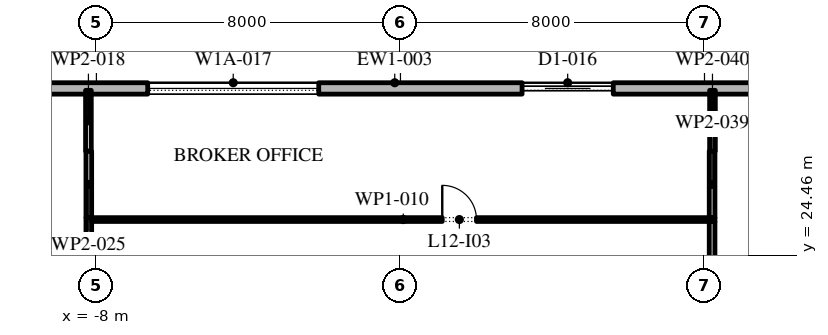
"""IFC4 building model, lengths in metres.
Left out: names, types, materials, properties, quantities, classifications, styles, units other than length and angle.
Written with IfcOpenShell. Run it as: python <this file> out.ifc"""

import sys

from ifc_helpers import new_model, si_unit, direction, frame, frame_2d, origin, place, context, subcontext, project, spatial, rectangle, extrude, element, fill, save


model = new_model("IFC4")
c1 = context("Model", 3, precision=1e-05, world=origin(), true_north=direction((0.0, 1.0)))
c2 = subcontext(c1, "Body", "Model", "MODEL_VIEW")
j1 = project(units=[si_unit("LENGTHUNIT", "METRE"), si_unit("PLANEANGLEUNIT", "RADIAN")], contexts=[c1])
p1 = place(None, origin())
s1 = spatial("IfcSite", under=j1, at=p1, CompositionType="ELEMENT")
p2 = place(p1, origin())
s2 = spatial("IfcBuilding", under=s1, at=p2, CompositionType="ELEMENT")
p3 = place(p2, frame((0.0, 0.0, 60.6)))
s3 = spatial("IfcBuildingStorey", under=s2, at=p3, CompositionType="ELEMENT", Elevation=60.6)
p4 = place(p3, frame((26.1, 28.85, 0.0), z_axis=(0.0, 0.0, 1.0), x_axis=(-1.0, 0.0, 0.0)))
e1 = element("IfcWall", 1, at=p4, inside=s3, PredefinedType="STANDARD", context=c2, shape_type="SweptSolid", body=[
    extrude(rectangle(XDim=52.5, YDim=0.3, at=frame_2d((26.25, 0.0))), origin(), (0.0, 0.0, 1.0), 4.0),
])
p5 = place(p4, frame((2.0, 0.0, 0.45)))
e2 = element("IfcOpeningElement", 2, at=p5, cuts=e1, PredefinedType="OPENING", context=c2, shape_type="SweptSolid", body=[
    extrude(rectangle(XDim=4.5, YDim=3.0, at=frame_2d((2.25, 1.5))), frame((0.0, 0.16, 0.0), z_axis=(0.0, -1.0, 0.0), x_axis=(1.0, 0.0, 0.0)), (0.0, 0.0, 1.0), 0.32),
])
p6 = place(p4, frame((10.65, 0.0, 0.45)))
e3 = element("IfcOpeningElement", 3, at=p6, cuts=e1, PredefinedType="OPENING", context=c2, shape_type="SweptSolid", body=[
    extrude(rectangle(XDim=4.5, YDim=3.0, at=frame_2d((2.25, 1.5))), frame((0.0, 0.16, 0.0), z_axis=(0.0, -1.0, 0.0), x_axis=(1.0, 0.0, 0.0)), (0.0, 0.0, 1.0), 0.32),
])
p7 = place(p4, frame((20.5, 0.0, 0.0)))
e4 = element("IfcOpeningElement", 4, at=p7, cuts=e1, PredefinedType="OPENING", context=c2, shape_type="SweptSolid", body=[
    extrude(rectangle(XDim=2.4, YDim=3.5, at=frame_2d((1.2, 1.75))), frame((0.0, 0.16, 0.0), z_axis=(0.0, -1.0, 0.0), x_axis=(1.0, 0.0, 0.0)), (0.0, 0.0, 1.0), 0.32),
])
p8 = place(p4, frame((28.25, 0.0, 0.45)))
e5 = element("IfcOpeningElement", 5, at=p8, cuts=e1, PredefinedType="OPENING", context=c2, shape_type="SweptSolid", body=[
    extrude(rectangle(XDim=4.5, YDim=3.0, at=frame_2d((2.25, 1.5))), frame((0.0, 0.16, 0.0), z_axis=(0.0, -1.0, 0.0), x_axis=(1.0, 0.0, 0.0)), (0.0, 0.0, 1.0), 0.32),
])
p9 = place(p4, frame((37.05, 0.0, 0.45)))
e6 = element("IfcOpeningElement", 6, at=p9, cuts=e1, PredefinedType="OPENING", context=c2, shape_type="SweptSolid", body=[
    extrude(rectangle(XDim=4.5, YDim=3.0, at=frame_2d((2.25, 1.5))), frame((0.0, 0.16, 0.0), z_axis=(0.0, -1.0, 0.0), x_axis=(1.0, 0.0, 0.0)), (0.0, 0.0, 1.0), 0.32),
])
p10 = place(p4, frame((45.85, 0.0, 0.45)))
e7 = element("IfcOpeningElement", 7, at=p10, cuts=e1, PredefinedType="OPENING", context=c2, shape_type="SweptSolid", body=[
    extrude(rectangle(XDim=4.5, YDim=3.0, at=frame_2d((2.25, 1.5))), frame((0.0, 0.16, 0.0), z_axis=(0.0, -1.0, 0.0), x_axis=(1.0, 0.0, 0.0)), (0.0, 0.0, 1.0), 0.32),
])
p11 = place(p3, frame((-8.21, 28.8, 0.0), z_axis=(0.0, 0.0, 1.0), x_axis=(0.0, -1.0, 0.0)))
e8 = element("IfcWall", 8, at=p11, inside=s3, PredefinedType="PARTITIONING", context=c2, shape_type="SweptSolid", body=[
    extrude(rectangle(XDim=1.6, YDim=0.15, at=frame_2d((0.8, 0.0))), origin(), (0.0, 0.0, 1.0), 4.0),
])
p12 = place(p3, frame((-8.2, 25.45, 0.0), z_axis=(0.0, 0.0, 1.0), x_axis=(0.0, -1.0, 0.0)))
e9 = element("IfcWall", 9, at=p12, inside=s3, PredefinedType="PARTITIONING", context=c2, shape_type="SweptSolid", body=[
    extrude(rectangle(XDim=6.375, YDim=0.15, at=frame_2d((3.188, 0.0))), origin(), (0.0, 0.0, 1.0), 4.0),
])
p13 = place(p3, frame((-8.125, 25.4, 0.0), z_axis=(0.0, 0.0, 1.0), x_axis=(1.0, 0.0, 0.0)))
e10 = element("IfcWall", 10, at=p13, inside=s3, PredefinedType="PARTITIONING", context=c2, shape_type="SweptSolid", body=[
    extrude(rectangle(XDim=16.4, YDim=0.1, at=frame_2d((8.2, 0.0))), origin(), (0.0, 0.0, 1.0), 4.0),
])
p14 = place(p13, frame((9.225, 0.0, 0.0)))
e11 = element("IfcOpeningElement", 11, at=p14, cuts=e10, PredefinedType="OPENING", context=c2, shape_type="SweptSolid", body=[
    extrude(rectangle(XDim=0.9, YDim=2.1, at=frame_2d((0.45, 1.05))), frame((0.0, 0.06, 0.0), z_axis=(0.0, -1.0, 0.0), x_axis=(1.0, 0.0, 0.0)), (0.0, 0.0, 1.0), 0.12),
])
p15 = place(p3, frame((-8.2, 27.2, 0.0), z_axis=(0.0, 0.0, 1.0), x_axis=(0.0, -1.0, 0.0)))
e12 = element("IfcWall", 12, at=p15, inside=s3, PredefinedType="PARTITIONING", context=c2, shape_type="SweptSolid", body=[
    extrude(rectangle(XDim=1.75, YDim=0.15, at=frame_2d((0.875, 0.0))), origin(), (0.0, 0.0, 1.0), 4.0),
])
p16 = place(p3, frame((8.2, 19.075, 0.0), z_axis=(0.0, 0.0, 1.0), x_axis=(0.0, 1.0, 0.0)))
e13 = element("IfcWall", 13, at=p16, inside=s3, PredefinedType="PARTITIONING", context=c2, shape_type="SweptSolid", body=[
    extrude(rectangle(XDim=6.275, YDim=0.15, at=frame_2d((3.138, 0.0))), origin(), (0.0, 0.0, 1.0), 4.0),
])
p17 = place(p3, frame((8.2, 25.45, 0.0), z_axis=(0.0, 0.0, 1.0), x_axis=(0.0, 1.0, 0.0)))
e14 = element("IfcWall", 14, at=p17, inside=s3, PredefinedType="PARTITIONING", context=c2, shape_type="SweptSolid", body=[
    extrude(rectangle(XDim=1.75, YDim=0.15, at=frame_2d((0.875, 0.0))), origin(), (0.0, 0.0, 1.0), 4.0),
])
p18 = place(p3, frame((8.21, 27.2, 0.0), z_axis=(0.0, 0.0, 1.0), x_axis=(0.0, 1.0, 0.0)))
e15 = element("IfcWall", 15, at=p18, inside=s3, PredefinedType="PARTITIONING", context=c2, shape_type="SweptSolid", body=[
    extrude(rectangle(XDim=1.6, YDim=0.15, at=frame_2d((0.8, 0.0))), origin(), (0.0, 0.0, 1.0), 4.0),
])
p19 = place(p7, origin())
e16 = element("IfcDoor", 16, at=p19, inside=s3, OperationType="DOUBLE_DOOR_SLIDING", PredefinedType="DOOR", context=c2, shape_type="SweptSolid", body=[
    extrude(rectangle(XDim=2.4, YDim=3.5, at=frame_2d((1.2, 1.75))), frame((0.0, 0.025, 0.0), z_axis=(0.0, -1.0, 0.0), x_axis=(1.0, 0.0, 0.0)), (0.0, 0.0, 1.0), 0.05),
])
fill(e4, e16)
p20 = place(p8, origin())
e17 = element("IfcWindow", 17, at=p20, inside=s3, PartitioningType="DOUBLE_PANEL_VERTICAL", PredefinedType="WINDOW", context=c2, shape_type="SweptSolid", body=[
    extrude(rectangle(XDim=4.5, YDim=3.0, at=frame_2d((2.25, 1.5))), frame((0.0, 0.03, 0.0), z_axis=(0.0, -1.0, 0.0), x_axis=(1.0, 0.0, 0.0)), (0.0, 0.0, 1.0), 0.06),
])
fill(e5, e17)
p21 = place(p14, origin())
e18 = element("IfcDoor", 18, at=p21, inside=s3, OperationType="SINGLE_SWING_RIGHT", PredefinedType="DOOR", context=c2, shape_type="SweptSolid", body=[
    extrude(rectangle(XDim=0.9, YDim=2.1, at=frame_2d((0.45, 1.05))), frame((0.0, 0.025, 0.0), z_axis=(0.0, -1.0, 0.0), x_axis=(1.0, 0.0, 0.0)), (0.0, 0.0, 1.0), 0.05),
])
fill(e11, e18)
save(model, sys.argv[1])
